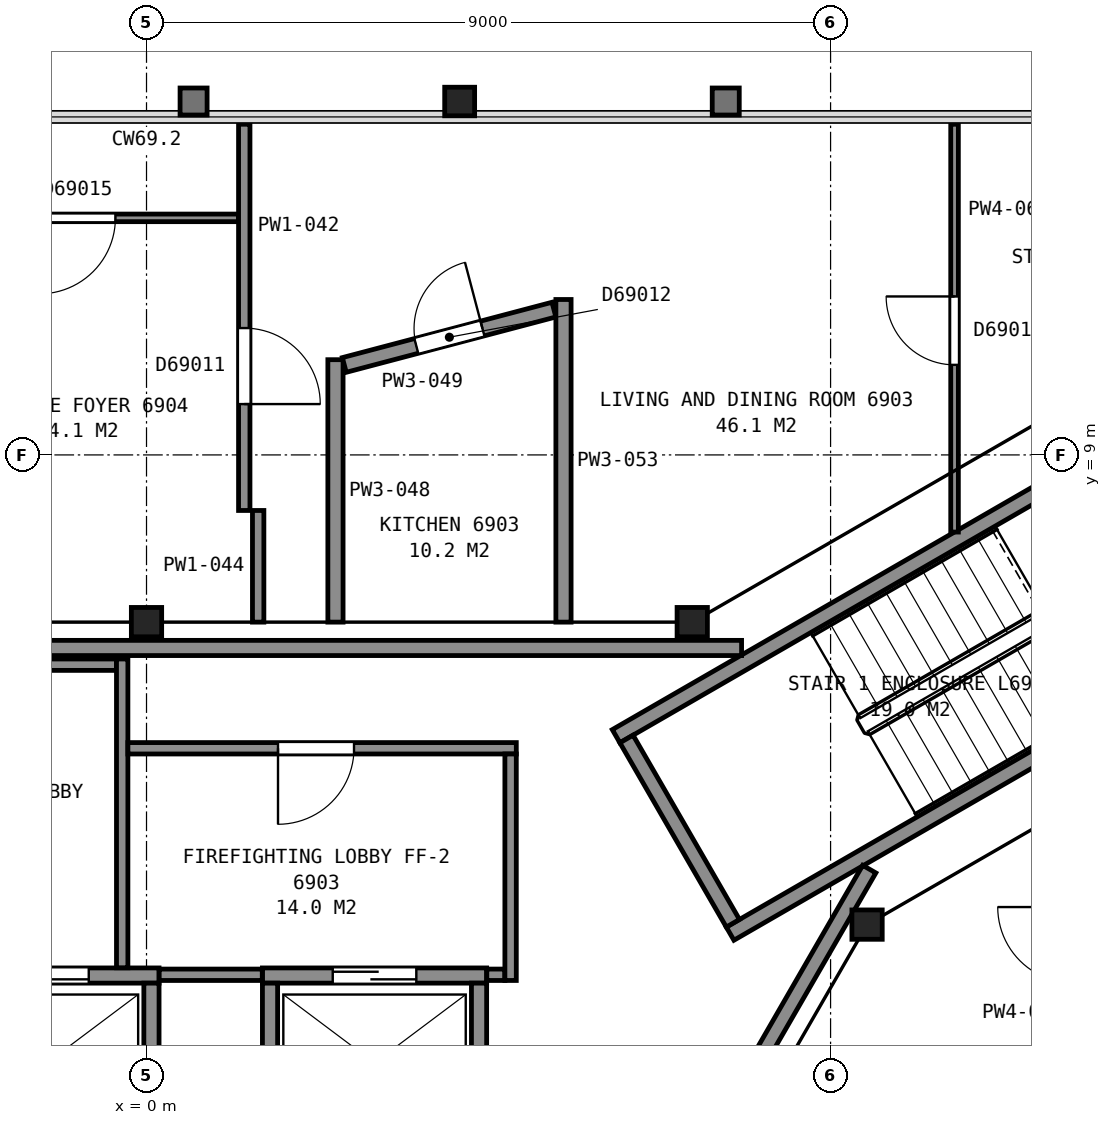
"""IFC4 building model, lengths in metres.
Left out: names, types, materials, properties, quantities, classifications, styles, units other than length and angle.
Written with IfcOpenShell. Run it as: python <this file> out.ifc"""

import sys

from ifc_helpers import new_model, si_unit, direction, frame, frame_2d, origin, origin_2d, place, context, subcontext, project, spatial, rectangle, i_section, extrude, element, fill, save


model = new_model("IFC4")
c1 = context("Model", 3, precision=1e-05, world=origin(), true_north=direction((0.0, 1.0)))
c2 = subcontext(c1, "Body", "Model", "MODEL_VIEW")
j1 = project(units=[si_unit("LENGTHUNIT", "METRE"), si_unit("PLANEANGLEUNIT", "RADIAN")], contexts=[c1])
p1 = place(None, origin())
s1 = spatial("IfcSite", under=j1, at=p1, CompositionType="ELEMENT")
p2 = place(p1, origin())
s2 = spatial("IfcBuilding", under=s1, at=p2, CompositionType="ELEMENT")
p3 = place(p2, frame((0.0, 0.0, 275.1)))
s3 = spatial("IfcBuildingStorey", under=s2, at=p3, CompositionType="ELEMENT", Elevation=275.1)
p4 = place(p3, frame((4.12, 13.65, 0.0), z_axis=(0.0, 0.0, 1.0), x_axis=(1.0, 0.0, 0.0)))
e1 = element("IfcColumn", 1, at=p4, inside=s3, PredefinedType="COLUMN", context=c2, shape_type="SweptSolid", body=[
    extrude(i_section(OverallWidth=0.394, OverallDepth=0.376, WebThickness=0.017, FlangeThickness=0.028, FilletRadius=0.015, at=origin_2d()), origin(), (0.0, 0.0, 1.0), 3.7),
])
for number, where, z_axis, x_axis in (
    (2, (9.48, 2.82, 0.0), (0.0, 0.0, 1.0), (1.0, 0.0, 0.0)),
    (3, (7.18, 6.8, 0.0), (0.0, 0.0, 1.0), (1.0, 0.0, 0.0)),
    (4, (0.0, 6.8, 0.0), (0.0, 0.0, 1.0), (1.0, 0.0, 0.0)),
):
    element("IfcColumn", number, at=place(p3, frame(where, z_axis=z_axis, x_axis=x_axis)), inside=s3, PredefinedType="COLUMN", context=c2, shape_type="SweptSolid", body=[
        extrude(i_section(OverallWidth=0.399, OverallDepth=0.386, WebThickness=0.021, FlangeThickness=0.033, FilletRadius=0.015, at=origin_2d()), origin(), (0.0, 0.0, 1.0), 3.7),
    ])
for number, where, z_axis, x_axis in (
    (5, (6.178, 5.299, 0.0), (0.0, 0.0, 1.0), (0.866, 0.5, 0.0)),
    (6, (7.678, 2.701, 0.0), (0.0, 0.0, 1.0), (0.866, 0.5, 0.0)),
):
    element("IfcWall", number, at=place(p3, frame(where, z_axis=z_axis, x_axis=x_axis)), inside=s3, PredefinedType="PARTITIONING", context=c2, shape_type="SweptSolid", body=[
        extrude(rectangle(XDim=7.2, YDim=0.2, at=frame_2d((3.6, 0.0))), origin(), (0.0, 0.0, 1.0), 3.45),
    ])
p5 = place(p3, frame((7.715, 2.838, 0.0), z_axis=(0.0, 0.0, 1.0), x_axis=(-0.500049511043, 0.865996816683, 0.0)))
e7 = element("IfcWall", 7, at=p5, inside=s3, PredefinedType="PARTITIONING", context=c2, shape_type="SweptSolid", body=[
    extrude(rectangle(XDim=2.8, YDim=0.2, at=frame_2d((1.4, 0.0))), origin(), (0.0, 0.0, 1.0), 3.45),
])
p6 = place(p3, frame((-2.785, 2.15, 0.0), z_axis=(0.0, 0.0, 1.0), x_axis=(1.0, 0.0, 0.0)))
e8 = element("IfcWall", 8, at=p6, inside=s3, PredefinedType="PARTITIONING", context=c2, shape_type="SweptSolid", body=[
    extrude(rectangle(XDim=2.95, YDim=0.2, at=frame_2d((1.475, 0.0))), origin(), (0.0, 0.0, 1.0), 3.7),
])
p7 = place(p6, frame((0.925, 0.0, 0.0)))
e9 = element("IfcOpeningElement", 9, at=p7, cuts=e8, PredefinedType="OPENING", context=c2, shape_type="SweptSolid", body=[
    extrude(rectangle(XDim=1.1, YDim=2.1, at=frame_2d((0.55, 1.05))), frame((0.0, 0.11, 0.0), z_axis=(0.0, -1.0, 0.0), x_axis=(1.0, 0.0, 0.0)), (0.0, 0.0, 1.0), 0.22),
])
p8 = place(p3, frame((1.525, 2.15, 0.0), z_axis=(0.0, 0.0, 1.0), x_axis=(1.0, 0.0, 0.0)))
e10 = element("IfcWall", 10, at=p8, inside=s3, PredefinedType="PARTITIONING", context=c2, shape_type="SweptSolid", body=[
    extrude(rectangle(XDim=2.95, YDim=0.2, at=frame_2d((1.475, 0.0))), origin(), (0.0, 0.0, 1.0), 3.7),
])
p9 = place(p8, frame((0.925, 0.0, 0.0)))
e11 = element("IfcOpeningElement", 11, at=p9, cuts=e10, PredefinedType="OPENING", context=c2, shape_type="SweptSolid", body=[
    extrude(rectangle(XDim=1.1, YDim=2.1, at=frame_2d((0.55, 1.05))), frame((0.0, 0.11, 0.0), z_axis=(0.0, -1.0, 0.0), x_axis=(1.0, 0.0, 0.0)), (0.0, 0.0, 1.0), 0.22),
])
for number, where, z_axis, x_axis in (
    (12, (4.375, 0.1, 0.0), (0.0, 0.0, 1.0), (0.0, 1.0, 0.0)),
    (13, (1.625, 0.1, 0.0), (0.0, 0.0, 1.0), (0.0, 1.0, 0.0)),
    (14, (0.065, 0.1, 0.0), (0.0, 0.0, 1.0), (0.0, 1.0, 0.0)),
):
    element("IfcWall", number, at=place(p3, frame(where, z_axis=z_axis, x_axis=x_axis)), inside=s3, PredefinedType="PARTITIONING", context=c2, shape_type="SweptSolid", body=[
        extrude(rectangle(XDim=1.95, YDim=0.2, at=frame_2d((0.975, 0.0))), origin(), (0.0, 0.0, 1.0), 3.7),
    ])
p10 = place(p3, frame((7.829, 6.46, 0.0), z_axis=(0.0, 0.0, 1.0), x_axis=(-1.0, 0.0, 0.0)))
e15 = element("IfcWall", 15, at=p10, inside=s3, PredefinedType="PARTITIONING", context=c2, shape_type="SweptSolid", body=[
    extrude(rectangle(XDim=15.658, YDim=0.2, at=frame_2d((7.829, 0.0))), origin(), (0.0, 0.0, 1.0), 3.45),
])
p11 = place(p10, frame((12.168, 0.0, 0.0)))
e16 = element("IfcOpeningElement", 16, at=p11, cuts=e15, PredefinedType="OPENING", context=c2, shape_type="SweptSolid", body=[
    extrude(rectangle(XDim=1.2, YDim=2.1, at=frame_2d((0.6, 1.05))), frame((0.0, 0.11, 0.0), z_axis=(0.0, -1.0, 0.0), x_axis=(1.0, 0.0, 0.0)), (0.0, 0.0, 1.0), 0.22),
])
p12 = place(p3, frame((-4.025, 6.24, 0.0), z_axis=(0.0, 0.0, 1.0), x_axis=(1.0, 0.0, 0.0)))
e17 = element("IfcWall", 17, at=p12, inside=s3, PredefinedType="PARTITIONING", context=c2, shape_type="SweptSolid", body=[
    extrude(rectangle(XDim=3.63, YDim=0.15, at=frame_2d((1.815, 0.0))), origin(), (0.0, 0.0, 1.0), 3.45),
])
p13 = place(p3, frame((-0.32, 2.252, 0.0), z_axis=(0.0, 0.0, 1.0), x_axis=(0.0, 1.0, 0.0)))
e18 = element("IfcWall", 18, at=p13, inside=s3, PredefinedType="PARTITIONING", context=c2, shape_type="SweptSolid", body=[
    extrude(rectangle(XDim=4.063, YDim=0.15, at=frame_2d((2.031, 0.0))), origin(), (0.0, 0.0, 1.0), 3.45),
])
p14 = place(p3, frame((-0.245, 5.14, 0.0), z_axis=(0.0, 0.0, 1.0), x_axis=(1.0, 0.0, 0.0)))
e19 = element("IfcWall", 19, at=p14, inside=s3, PredefinedType="PARTITIONING", context=c2, shape_type="SweptSolid", body=[
    extrude(rectangle(XDim=5.11, YDim=0.15, at=frame_2d((2.555, 0.0))), origin(), (0.0, 0.0, 1.0), 3.45),
])
p15 = place(p14, frame((1.975, 0.0, 0.0)))
e20 = element("IfcOpeningElement", 20, at=p15, cuts=e19, PredefinedType="OPENING", context=c2, shape_type="SweptSolid", body=[
    extrude(rectangle(XDim=1.0, YDim=2.1, at=frame_2d((0.5, 1.05))), frame((0.0, 0.085, 0.0), z_axis=(0.0, -1.0, 0.0), x_axis=(1.0, 0.0, 0.0)), (0.0, 0.0, 1.0), 0.17),
])
p16 = place(p3, frame((0.167, 2.16, 0.0), z_axis=(0.0, 0.0, 1.0), x_axis=(1.0, 0.0, 0.0)))
e21 = element("IfcWall", 21, at=p16, inside=s3, PredefinedType="PARTITIONING", context=c2, shape_type="SweptSolid", body=[
    extrude(rectangle(XDim=1.356, YDim=0.15, at=frame_2d((0.678, 0.0))), origin(), (0.0, 0.0, 1.0), 3.45),
])
p17 = place(p3, frame((3.828, -6.29, 0.0), z_axis=(0.0, 0.0, 1.0), x_axis=(0.499979739078, 0.866037101117, 0.0)))
e22 = element("IfcWall", 22, at=p17, inside=s3, PredefinedType="PARTITIONING", context=c2, shape_type="SweptSolid", body=[
    extrude(rectangle(XDim=11.363, YDim=0.2, at=frame_2d((5.681, 0.0))), origin(), (0.0, 0.0, 1.0), 3.45),
])
p18 = place(p17, frame((0.55, 0.0, 0.0)))
e23 = element("IfcOpeningElement", 23, at=p18, cuts=e22, PredefinedType="OPENING", context=c2, shape_type="SweptSolid", body=[
    extrude(rectangle(XDim=1.2, YDim=2.1, at=frame_2d((0.6, 1.05))), frame((0.0, 0.11, 0.0), z_axis=(0.0, -1.0, 0.0), x_axis=(1.0, 0.0, 0.0)), (0.0, 0.0, 1.0), 0.22),
])
p19 = place(p3, frame((4.477, 2.16, 0.0), z_axis=(0.0, 0.0, 1.0), x_axis=(1.0, 0.0, 0.0)))
e24 = element("IfcWall", 24, at=p19, inside=s3, PredefinedType="PARTITIONING", context=c2, shape_type="SweptSolid", body=[
    extrude(rectangle(XDim=0.238, YDim=0.15, at=frame_2d((0.119, 0.0))), origin(), (0.0, 0.0, 1.0), 3.45),
])
p20 = place(p3, frame((4.79, 2.085, 0.0), z_axis=(0.0, 0.0, 1.0), x_axis=(0.0, 1.0, 0.0)))
e25 = element("IfcWall", 25, at=p20, inside=s3, PredefinedType="PARTITIONING", context=c2, shape_type="SweptSolid", body=[
    extrude(rectangle(XDim=2.98, YDim=0.15, at=frame_2d((1.49, 0.0))), origin(), (0.0, 0.0, 1.0), 3.45),
])
p21 = place(p3, frame((-3.109, 12.119, 0.0), z_axis=(0.0, 0.0, 1.0), x_axis=(1.0, 0.0, 0.0)))
e26 = element("IfcWall", 26, at=p21, inside=s3, PredefinedType="PARTITIONING", context=c2, shape_type="SweptSolid", body=[
    extrude(rectangle(XDim=4.32, YDim=0.1, at=frame_2d((2.16, 0.0))), origin(), (0.0, 0.0, 1.0), 2.723),
])
p22 = place(p21, frame((1.7, 0.0, 0.0)))
e27 = element("IfcOpeningElement", 27, at=p22, cuts=e26, PredefinedType="OPENING", context=c2, shape_type="SweptSolid", body=[
    extrude(rectangle(XDim=1.0, YDim=2.1, at=frame_2d((0.5, 1.05))), frame((0.0, 0.06, 0.0), z_axis=(0.0, -1.0, 0.0), x_axis=(1.0, 0.0, 0.0)), (0.0, 0.0, 1.0), 0.12),
])
p23 = place(p3, frame((1.286, 13.351, 0.0), z_axis=(0.0, 0.0, 1.0), x_axis=(0.0, -1.0, 0.0)))
e28 = element("IfcWall", 28, at=p23, inside=s3, PredefinedType="PARTITIONING", context=c2, shape_type="SweptSolid", body=[
    extrude(rectangle(XDim=5.082, YDim=0.15, at=frame_2d((2.541, 0.0))), origin(), (0.0, 0.0, 1.0), 2.723),
])
p24 = place(p23, frame((2.682, 0.0, 0.0)))
e29 = element("IfcOpeningElement", 29, at=p24, cuts=e28, PredefinedType="OPENING", context=c2, shape_type="SweptSolid", body=[
    extrude(rectangle(XDim=1.0, YDim=2.1, at=frame_2d((0.5, 1.05))), frame((0.0, 0.085, 0.0), z_axis=(0.0, -1.0, 0.0), x_axis=(1.0, 0.0, 0.0)), (0.0, 0.0, 1.0), 0.17),
])
p25 = place(p3, frame((1.469, 6.8, 0.0), z_axis=(0.0, 0.0, 1.0), x_axis=(0.0, 1.0, 0.0)))
e30 = element("IfcWall", 30, at=p25, inside=s3, PredefinedType="PARTITIONING", context=c2, shape_type="SweptSolid", body=[
    extrude(rectangle(XDim=1.469, YDim=0.15, at=frame_2d((0.734, 0.0))), origin(), (0.0, 0.0, 1.0), 2.723),
])
p26 = place(p3, frame((2.486, 6.8, 0.0), z_axis=(0.0, 0.0, 1.0), x_axis=(0.0, 1.0, 0.0)))
e31 = element("IfcWall", 31, at=p26, inside=s3, PredefinedType="PARTITIONING", context=c2, shape_type="SweptSolid", body=[
    extrude(rectangle(XDim=3.453, YDim=0.2, at=frame_2d((1.727, 0.0))), origin(), (0.0, 0.0, 1.0), 2.723),
])
p27 = place(p3, frame((5.36, 10.912, 0.0), z_axis=(0.0, 0.0, 1.0), x_axis=(-0.966866921155, -0.255280936963, 0.0)))
e32 = element("IfcWall", 32, at=p27, inside=s3, PredefinedType="PARTITIONING", context=c2, shape_type="SweptSolid", body=[
    extrude(rectangle(XDim=2.853, YDim=0.2, at=frame_2d((1.426, 0.0))), origin(), (0.0, 0.0, 1.0), 2.723),
])
p28 = place(p27, frame((0.973, 0.0, 0.0)))
e33 = element("IfcOpeningElement", 33, at=p28, cuts=e32, PredefinedType="OPENING", context=c2, shape_type="SweptSolid", body=[
    extrude(rectangle(XDim=0.9, YDim=2.1, at=frame_2d((0.45, 1.05))), frame((0.0, 0.11, 0.0), z_axis=(0.0, -1.0, 0.0), x_axis=(1.0, 0.0, 0.0)), (0.0, 0.0, 1.0), 0.22),
])
p29 = place(p3, frame((5.486, 6.8, 0.0), z_axis=(0.0, 0.0, 1.0), x_axis=(0.0, 1.0, 0.0)))
e34 = element("IfcWall", 34, at=p29, inside=s3, PredefinedType="PARTITIONING", context=c2, shape_type="SweptSolid", body=[
    extrude(rectangle(XDim=4.245, YDim=0.2, at=frame_2d((2.123, 0.0))), origin(), (0.0, 0.0, 1.0), 2.723),
])
p30 = place(p3, frame((10.631, 13.351, 0.0), z_axis=(0.0, 0.0, 1.0), x_axis=(0.0, -1.0, 0.0)))
e35 = element("IfcWall", 35, at=p30, inside=s3, PredefinedType="PARTITIONING", context=c2, shape_type="SweptSolid", body=[
    extrude(rectangle(XDim=5.366, YDim=0.1, at=frame_2d((2.683, 0.0))), origin(), (0.0, 0.0, 1.0), 2.723),
])
p31 = place(p30, frame((2.266, 0.0, 0.0)))
e36 = element("IfcOpeningElement", 36, at=p31, cuts=e35, PredefinedType="OPENING", context=c2, shape_type="SweptSolid", body=[
    extrude(rectangle(XDim=0.9, YDim=2.1, at=frame_2d((0.45, 1.05))), frame((0.0, 0.06, 0.0), z_axis=(0.0, -1.0, 0.0), x_axis=(1.0, 0.0, 0.0)), (0.0, 0.0, 1.0), 0.12),
])
p32 = place(p3, frame((10.878, 0.03, 0.0), z_axis=(0.0, 0.0, 1.0), x_axis=(0.707173379423, 0.707040176677, 0.0)))
e37 = element("IfcWall", 37, at=p32, inside=s3, PredefinedType="PARTITIONING", context=c2, shape_type="SweptSolid", body=[
    extrude(rectangle(XDim=1.833, YDim=0.2, at=frame_2d((0.917, 0.0))), origin(), (0.0, 0.0, 1.0), 2.723),
])
p33 = place(p7, origin())
e38 = element("IfcDoor", 38, at=p33, inside=s3, OperationType="SLIDING_TO_LEFT", PredefinedType="DOOR", context=c2, shape_type="SweptSolid", body=[
    extrude(rectangle(XDim=1.1, YDim=2.1, at=frame_2d((0.55, 1.05))), frame((0.0, 0.025, 0.0), z_axis=(0.0, -1.0, 0.0), x_axis=(1.0, 0.0, 0.0)), (0.0, 0.0, 1.0), 0.05),
])
fill(e9, e38)
p34 = place(p9, origin())
e39 = element("IfcDoor", 39, at=p34, inside=s3, OperationType="SLIDING_TO_RIGHT", PredefinedType="DOOR", context=c2, shape_type="SweptSolid", body=[
    extrude(rectangle(XDim=1.1, YDim=2.1, at=frame_2d((0.55, 1.05))), frame((0.0, 0.025, 0.0), z_axis=(0.0, -1.0, 0.0), x_axis=(1.0, 0.0, 0.0)), (0.0, 0.0, 1.0), 0.05),
])
fill(e11, e39)
p35 = place(p15, origin())
e40 = element("IfcDoor", 40, at=p35, inside=s3, OperationType="SINGLE_SWING_LEFT", PredefinedType="DOOR", context=c2, shape_type="SweptSolid", body=[
    extrude(rectangle(XDim=1.0, YDim=2.1, at=frame_2d((0.5, 1.05))), frame((0.0, 0.025, 0.0), z_axis=(0.0, -1.0, 0.0), x_axis=(1.0, 0.0, 0.0)), (0.0, 0.0, 1.0), 0.05),
])
fill(e20, e40)
p36 = place(p22, origin())
e41 = element("IfcDoor", 41, at=p36, inside=s3, OperationType="SINGLE_SWING_LEFT", PredefinedType="DOOR", context=c2, shape_type="SweptSolid", body=[
    extrude(rectangle(XDim=1.0, YDim=2.1, at=frame_2d((0.5, 1.05))), frame((0.0, 0.025, 0.0), z_axis=(0.0, -1.0, 0.0), x_axis=(1.0, 0.0, 0.0)), (0.0, 0.0, 1.0), 0.05),
])
fill(e27, e41)
p37 = place(p24, origin())
e42 = element("IfcDoor", 42, at=p37, inside=s3, OperationType="SINGLE_SWING_RIGHT", PredefinedType="DOOR", context=c2, shape_type="SweptSolid", body=[
    extrude(rectangle(XDim=1.0, YDim=2.1, at=frame_2d((0.5, 1.05))), frame((0.0, 0.025, 0.0), z_axis=(0.0, -1.0, 0.0), x_axis=(1.0, 0.0, 0.0)), (0.0, 0.0, 1.0), 0.05),
])
fill(e29, e42)
p38 = place(p28, origin())
e43 = element("IfcDoor", 43, at=p38, inside=s3, OperationType="SINGLE_SWING_LEFT", PredefinedType="DOOR", context=c2, shape_type="SweptSolid", body=[
    extrude(rectangle(XDim=0.9, YDim=2.1, at=frame_2d((0.45, 1.05))), frame((0.0, 0.025, 0.0), z_axis=(0.0, -1.0, 0.0), x_axis=(1.0, 0.0, 0.0)), (0.0, 0.0, 1.0), 0.05),
])
fill(e33, e43)
p39 = place(p31, origin())
e44 = element("IfcDoor", 44, at=p39, inside=s3, OperationType="SINGLE_SWING_LEFT", PredefinedType="DOOR", context=c2, shape_type="SweptSolid", body=[
    extrude(rectangle(XDim=0.9, YDim=2.1, at=frame_2d((0.45, 1.05))), frame((0.0, 0.025, 0.0), z_axis=(0.0, -1.0, 0.0), x_axis=(1.0, 0.0, 0.0)), (0.0, 0.0, 1.0), 0.05),
])
fill(e36, e44)
save(model, sys.argv[1])
